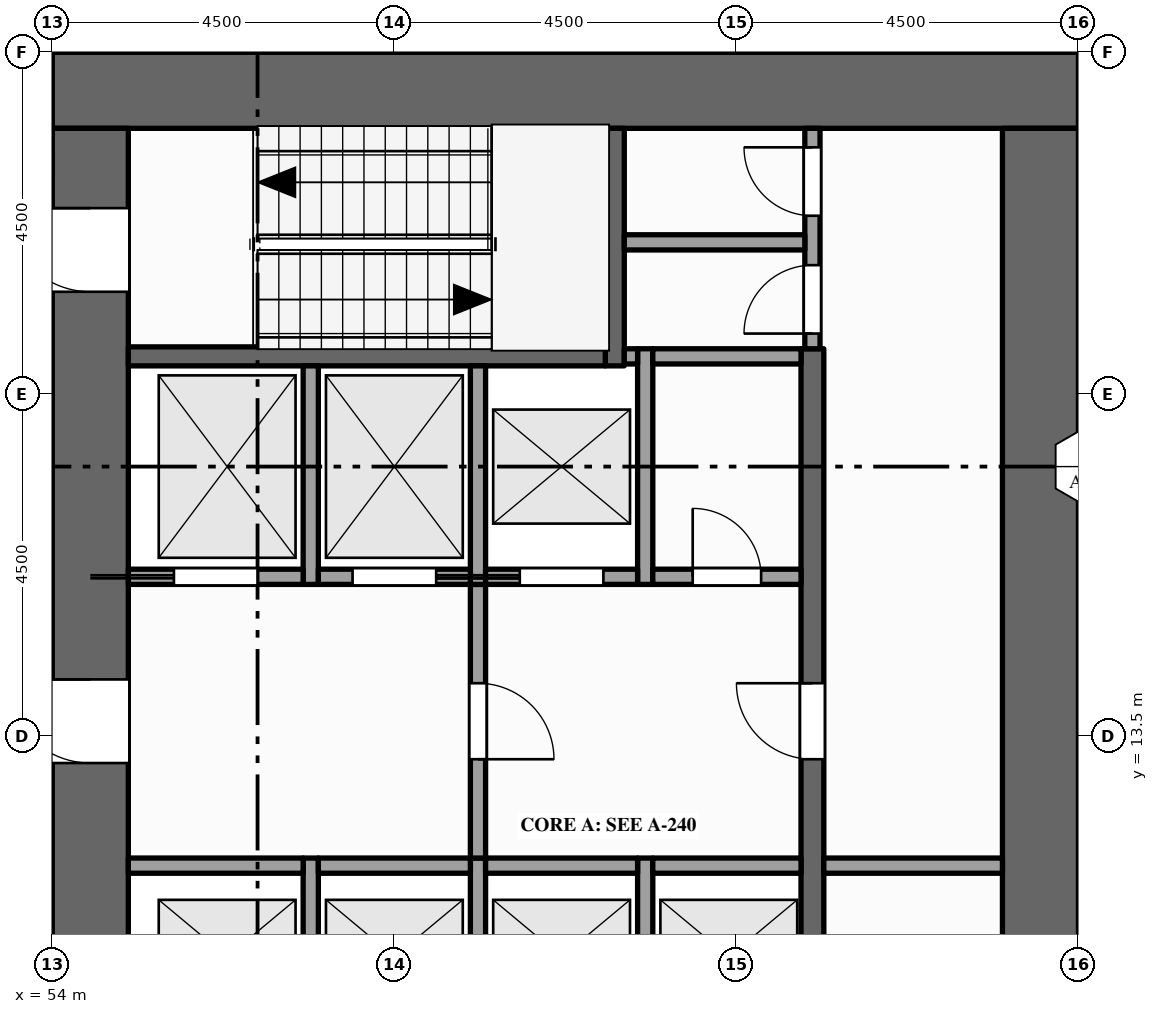
"""IFC4 building model, lengths in metres.
Left out: names, types, materials, properties, quantities, classifications, styles, units other than length and angle.
Written with IfcOpenShell. Run it as: python <this file> out.ifc"""

import sys

from ifc_helpers import new_model, si_unit, direction, frame, frame_2d, origin, place, context, subcontext, project, spatial, rectangle, extrude, element, fill, save


model = new_model("IFC4")
c1 = context("Model", 3, precision=1e-05, world=origin(), true_north=direction((0.0, 1.0)))
c2 = subcontext(c1, "Body", "Model", "MODEL_VIEW")
j1 = project(units=[si_unit("LENGTHUNIT", "METRE"), si_unit("PLANEANGLEUNIT", "RADIAN")], contexts=[c1])
p1 = place(None, origin())
s1 = spatial("IfcSite", under=j1, at=p1, CompositionType="ELEMENT")
p2 = place(p1, origin())
s2 = spatial("IfcBuilding", under=s1, at=p2, CompositionType="ELEMENT")
p3 = place(p2, frame((0.0, 0.0, 223.0)))
s3 = spatial("IfcBuildingStorey", under=s2, at=p3, CompositionType="ELEMENT", Elevation=223.0)
p4 = place(p3, frame((54.0, 22.0, -0.15), z_axis=(0.0, 0.0, 1.0), x_axis=(1.0, 0.0, 0.0)))
e1 = element("IfcWall", 1, at=p4, inside=s3, PredefinedType="SHEAR", context=c2, shape_type="SweptSolid", body=[
    extrude(rectangle(XDim=13.5, YDim=1.0, at=frame_2d((6.75, 0.0))), origin(), (0.0, 0.0, 1.0), 4.0),
])
p5 = place(p3, frame((54.5, 1.0, -0.15), z_axis=(0.0, 0.0, 1.0), x_axis=(0.0, 1.0, 0.0)))
e2 = element("IfcWall", 2, at=p5, inside=s3, PredefinedType="SHEAR", context=c2, shape_type="SweptSolid", body=[
    extrude(rectangle(XDim=20.5, YDim=1.0, at=frame_2d((10.25, 0.0))), origin(), (0.0, 0.0, 1.0), 4.0),
])
p6 = place(p5, frame((6.1, 0.0, 0.15)))
e3 = element("IfcOpeningElement", 3, at=p6, cuts=e2, PredefinedType="OPENING", context=c2, shape_type="SweptSolid", body=[
    extrude(rectangle(XDim=1.8, YDim=2.1, at=frame_2d((0.9, 1.05))), frame((0.0, 0.51, 0.0), z_axis=(0.0, -1.0, 0.0), x_axis=(1.0, 0.0, 0.0)), (0.0, 0.0, 1.0), 1.02),
])
p7 = place(p5, frame((12.15, 0.0, 0.15)))
e4 = element("IfcOpeningElement", 4, at=p7, cuts=e2, PredefinedType="OPENING", context=c2, shape_type="SweptSolid", body=[
    extrude(rectangle(XDim=1.1, YDim=2.1, at=frame_2d((0.55, 1.05))), frame((0.0, 0.51, 0.0), z_axis=(0.0, -1.0, 0.0), x_axis=(1.0, 0.0, 0.0)), (0.0, 0.0, 1.0), 1.02),
])
p8 = place(p5, frame((1.15, 0.0, 0.15)))
e5 = element("IfcOpeningElement", 5, at=p8, cuts=e2, PredefinedType="OPENING", context=c2, shape_type="SweptSolid", body=[
    extrude(rectangle(XDim=1.1, YDim=2.1, at=frame_2d((0.55, 1.05))), frame((0.0, 0.51, 0.0), z_axis=(0.0, -1.0, 0.0), x_axis=(1.0, 0.0, 0.0)), (0.0, 0.0, 1.0), 1.02),
])
p9 = place(p5, frame((18.35, 0.0, 0.15)))
e6 = element("IfcOpeningElement", 6, at=p9, cuts=e2, PredefinedType="OPENING", context=c2, shape_type="SweptSolid", body=[
    extrude(rectangle(XDim=1.1, YDim=2.1, at=frame_2d((0.55, 1.05))), frame((0.0, 0.51, 0.0), z_axis=(0.0, -1.0, 0.0), x_axis=(1.0, 0.0, 0.0)), (0.0, 0.0, 1.0), 1.02),
])
p10 = place(p3, frame((67.0, 1.0, -0.15), z_axis=(0.0, 0.0, 1.0), x_axis=(0.0, 1.0, 0.0)))
e7 = element("IfcWall", 7, at=p10, inside=s3, PredefinedType="SHEAR", context=c2, shape_type="SweptSolid", body=[
    extrude(rectangle(XDim=20.5, YDim=1.0, at=frame_2d((10.25, 0.0))), origin(), (0.0, 0.0, 1.0), 4.0),
])
p11 = place(p3, frame((57.4, 9.3, 0.0), z_axis=(0.0, 0.0, 1.0), x_axis=(0.0, 1.0, 0.0)))
e8 = element("IfcWall", 8, at=p11, inside=s3, PredefinedType="SOLIDWALL", context=c2, shape_type="SweptSolid", body=[
    extrude(rectangle(XDim=2.6, YDim=0.2, at=frame_2d((1.3, 0.0))), origin(), (0.0, 0.0, 1.0), 3.85),
])
p12 = place(p3, frame((57.4, 15.5, 0.0), z_axis=(0.0, 0.0, 1.0), x_axis=(0.0, 1.0, 0.0)))
e9 = element("IfcWall", 9, at=p12, inside=s3, PredefinedType="SOLIDWALL", context=c2, shape_type="SweptSolid", body=[
    extrude(rectangle(XDim=2.875, YDim=0.2, at=frame_2d((1.438, 0.0))), origin(), (0.0, 0.0, 1.0), 3.85),
])
p13 = place(p3, frame((59.6, 9.3, 0.0), z_axis=(0.0, 0.0, 1.0), x_axis=(0.0, 1.0, 0.0)))
e10 = element("IfcWall", 10, at=p13, inside=s3, PredefinedType="SOLIDWALL", context=c2, shape_type="SweptSolid", body=[
    extrude(rectangle(XDim=2.6, YDim=0.2, at=frame_2d((1.3, 0.0))), origin(), (0.0, 0.0, 1.0), 3.85),
])
p14 = place(p3, frame((59.6, 11.9, 0.0), z_axis=(0.0, 0.0, 1.0), x_axis=(0.0, 1.0, 0.0)))
e11 = element("IfcWall", 11, at=p14, inside=s3, PredefinedType="PARTITIONING", context=c2, shape_type="SweptSolid", body=[
    extrude(rectangle(XDim=3.6, YDim=0.2, at=frame_2d((1.8, 0.0))), origin(), (0.0, 0.0, 1.0), 3.85),
])
p15 = place(p14, frame((1.3, 0.0, 0.0)))
e12 = element("IfcOpeningElement", 12, at=p15, cuts=e11, PredefinedType="OPENING", context=c2, shape_type="SweptSolid", body=[
    extrude(rectangle(XDim=1.0, YDim=2.1, at=frame_2d((0.5, 1.05))), frame((0.0, 0.11, 0.0), z_axis=(0.0, -1.0, 0.0), x_axis=(1.0, 0.0, 0.0)), (0.0, 0.0, 1.0), 0.22),
])
p16 = place(p3, frame((59.6, 15.5, 0.0), z_axis=(0.0, 0.0, 1.0), x_axis=(0.0, 1.0, 0.0)))
e13 = element("IfcWall", 13, at=p16, inside=s3, PredefinedType="SOLIDWALL", context=c2, shape_type="SweptSolid", body=[
    extrude(rectangle(XDim=2.875, YDim=0.2, at=frame_2d((1.438, 0.0))), origin(), (0.0, 0.0, 1.0), 3.85),
])
p17 = place(p3, frame((61.4, 18.375, 0.0), z_axis=(0.0, 0.0, 1.0), x_axis=(0.0, 1.0, 0.0)))
e14 = element("IfcWall", 14, at=p17, inside=s3, PredefinedType="SHEAR", context=c2, shape_type="SweptSolid", body=[
    extrude(rectangle(XDim=3.125, YDim=0.25, at=frame_2d((1.562, 0.0))), origin(), (0.0, 0.0, 1.0), 3.85),
])
p18 = place(p3, frame((61.8, 9.3, 0.0), z_axis=(0.0, 0.0, 1.0), x_axis=(0.0, 1.0, 0.0)))
e15 = element("IfcWall", 15, at=p18, inside=s3, PredefinedType="SOLIDWALL", context=c2, shape_type="SweptSolid", body=[
    extrude(rectangle(XDim=2.6, YDim=0.2, at=frame_2d((1.3, 0.0))), origin(), (0.0, 0.0, 1.0), 3.85),
])
p19 = place(p3, frame((61.8, 15.5, 0.0), z_axis=(0.0, 0.0, 1.0), x_axis=(0.0, 1.0, 0.0)))
e16 = element("IfcWall", 16, at=p19, inside=s3, PredefinedType="SOLIDWALL", context=c2, shape_type="SweptSolid", body=[
    extrude(rectangle(XDim=3.1, YDim=0.2, at=frame_2d((1.55, 0.0))), origin(), (0.0, 0.0, 1.0), 3.85),
])
p20 = place(p3, frame((64.0, 4.1, 0.0), z_axis=(0.0, 0.0, 1.0), x_axis=(0.0, 1.0, 0.0)))
e17 = element("IfcWall", 17, at=p20, inside=s3, PredefinedType="SHEAR", context=c2, shape_type="SweptSolid", body=[
    extrude(rectangle(XDim=14.5, YDim=0.3, at=frame_2d((7.25, 0.0))), origin(), (0.0, 0.0, 1.0), 3.85),
])
p21 = place(p20, frame((3.4, 0.0, 0.0)))
e18 = element("IfcOpeningElement", 18, at=p21, cuts=e17, PredefinedType="OPENING", context=c2, shape_type="SweptSolid", body=[
    extrude(rectangle(XDim=1.0, YDim=2.1, at=frame_2d((0.5, 1.05))), frame((0.0, 0.16, 0.0), z_axis=(0.0, -1.0, 0.0), x_axis=(1.0, 0.0, 0.0)), (0.0, 0.0, 1.0), 0.32),
])
p22 = place(p20, frame((9.1, 0.0, 0.0)))
e19 = element("IfcOpeningElement", 19, at=p22, cuts=e17, PredefinedType="OPENING", context=c2, shape_type="SweptSolid", body=[
    extrude(rectangle(XDim=1.0, YDim=2.1, at=frame_2d((0.5, 1.05))), frame((0.0, 0.16, 0.0), z_axis=(0.0, -1.0, 0.0), x_axis=(1.0, 0.0, 0.0)), (0.0, 0.0, 1.0), 0.32),
])
p23 = place(p3, frame((64.0, 18.6, 0.0), z_axis=(0.0, 0.0, 1.0), x_axis=(0.0, 1.0, 0.0)))
e20 = element("IfcWall", 20, at=p23, inside=s3, PredefinedType="PARTITIONING", context=c2, shape_type="SweptSolid", body=[
    extrude(rectangle(XDim=2.9, YDim=0.2, at=frame_2d((1.45, 0.0))), origin(), (0.0, 0.0, 1.0), 3.85),
])
p24 = place(p23, frame((0.2, 0.0, 0.0)))
e21 = element("IfcOpeningElement", 21, at=p24, cuts=e20, PredefinedType="OPENING", context=c2, shape_type="SweptSolid", body=[
    extrude(rectangle(XDim=0.9, YDim=2.1, at=frame_2d((0.45, 1.05))), frame((0.0, 0.11, 0.0), z_axis=(0.0, -1.0, 0.0), x_axis=(1.0, 0.0, 0.0)), (0.0, 0.0, 1.0), 0.22),
])
p25 = place(p23, frame((1.75, 0.0, 0.0)))
e22 = element("IfcOpeningElement", 22, at=p25, cuts=e20, PredefinedType="OPENING", context=c2, shape_type="SweptSolid", body=[
    extrude(rectangle(XDim=0.9, YDim=2.1, at=frame_2d((0.45, 1.05))), frame((0.0, 0.11, 0.0), z_axis=(0.0, -1.0, 0.0), x_axis=(1.0, 0.0, 0.0)), (0.0, 0.0, 1.0), 0.22),
])
p26 = place(p3, frame((55.0, 11.8, 0.0), z_axis=(0.0, 0.0, 1.0), x_axis=(1.0, 0.0, 0.0)))
e23 = element("IfcWall", 23, at=p26, inside=s3, PredefinedType="SOLIDWALL", context=c2, shape_type="SweptSolid", body=[
    extrude(rectangle(XDim=2.3, YDim=0.2, at=frame_2d((1.15, 0.0))), origin(), (0.0, 0.0, 1.0), 3.85),
])
for number, where, z_axis, x_axis in (
    (24, (57.5, 11.8, 0.0), (0.0, 0.0, 1.0), (1.0, 0.0, 0.0)),
    (25, (59.7, 11.8, 0.0), (0.0, 0.0, 1.0), (1.0, 0.0, 0.0)),
):
    element("IfcWall", number, at=place(p3, frame(where, z_axis=z_axis, x_axis=x_axis)), inside=s3, PredefinedType="SOLIDWALL", context=c2, shape_type="SweptSolid", body=[
        extrude(rectangle(XDim=2.0, YDim=0.2, at=frame_2d((1.0, 0.0))), origin(), (0.0, 0.0, 1.0), 3.85),
    ])
p27 = place(p3, frame((61.9, 11.8, 0.0), z_axis=(0.0, 0.0, 1.0), x_axis=(1.0, 0.0, 0.0)))
e26 = element("IfcWall", 26, at=p27, inside=s3, PredefinedType="SOLIDWALL", context=c2, shape_type="SweptSolid", body=[
    extrude(rectangle(XDim=1.95, YDim=0.2, at=frame_2d((0.975, 0.0))), origin(), (0.0, 0.0, 1.0), 3.85),
])
p28 = place(p3, frame((64.15, 11.8, 0.0), z_axis=(0.0, 0.0, 1.0), x_axis=(1.0, 0.0, 0.0)))
e27 = element("IfcWall", 27, at=p28, inside=s3, PredefinedType="PARTITIONING", context=c2, shape_type="SweptSolid", body=[
    extrude(rectangle(XDim=2.35, YDim=0.2, at=frame_2d((1.175, 0.0))), origin(), (0.0, 0.0, 1.0), 3.85),
])
p29 = place(p3, frame((55.0, 15.6, 0.0), z_axis=(0.0, 0.0, 1.0), x_axis=(1.0, 0.0, 0.0)))
e28 = element("IfcWall", 28, at=p29, inside=s3, PredefinedType="SOLIDWALL", context=c2, shape_type="SweptSolid", body=[
    extrude(rectangle(XDim=2.3, YDim=0.2, at=frame_2d((1.15, 0.0))), origin(), (0.0, 0.0, 1.0), 3.85),
])
p30 = place(p29, frame((0.6, 0.0, 0.012)))
e29 = element("IfcOpeningElement", 29, at=p30, cuts=e28, PredefinedType="OPENING", context=c2, shape_type="SweptSolid", body=[
    extrude(rectangle(XDim=1.1, YDim=2.1, at=frame_2d((0.55, 1.05))), frame((0.0, 0.11, 0.0), z_axis=(0.0, -1.0, 0.0), x_axis=(1.0, 0.0, 0.0)), (0.0, 0.0, 1.0), 0.22),
])
p31 = place(p3, frame((57.5, 15.6, 0.0), z_axis=(0.0, 0.0, 1.0), x_axis=(1.0, 0.0, 0.0)))
e30 = element("IfcWall", 30, at=p31, inside=s3, PredefinedType="SOLIDWALL", context=c2, shape_type="SweptSolid", body=[
    extrude(rectangle(XDim=2.0, YDim=0.2, at=frame_2d((1.0, 0.0))), origin(), (0.0, 0.0, 1.0), 3.85),
])
p32 = place(p31, frame((0.45, 0.0, 0.012)))
e31 = element("IfcOpeningElement", 31, at=p32, cuts=e30, PredefinedType="OPENING", context=c2, shape_type="SweptSolid", body=[
    extrude(rectangle(XDim=1.1, YDim=2.1, at=frame_2d((0.55, 1.05))), frame((0.0, 0.11, 0.0), z_axis=(0.0, -1.0, 0.0), x_axis=(1.0, 0.0, 0.0)), (0.0, 0.0, 1.0), 0.22),
])
p33 = place(p3, frame((59.7, 15.6, 0.0), z_axis=(0.0, 0.0, 1.0), x_axis=(1.0, 0.0, 0.0)))
e32 = element("IfcWall", 32, at=p33, inside=s3, PredefinedType="SOLIDWALL", context=c2, shape_type="SweptSolid", body=[
    extrude(rectangle(XDim=2.0, YDim=0.2, at=frame_2d((1.0, 0.0))), origin(), (0.0, 0.0, 1.0), 3.85),
])
p34 = place(p33, frame((0.45, 0.0, 0.012)))
e33 = element("IfcOpeningElement", 33, at=p34, cuts=e32, PredefinedType="OPENING", context=c2, shape_type="SweptSolid", body=[
    extrude(rectangle(XDim=1.1, YDim=2.1, at=frame_2d((0.55, 1.05))), frame((0.0, 0.11, 0.0), z_axis=(0.0, -1.0, 0.0), x_axis=(1.0, 0.0, 0.0)), (0.0, 0.0, 1.0), 0.22),
])
p35 = place(p3, frame((61.9, 15.6, 0.0), z_axis=(0.0, 0.0, 1.0), x_axis=(1.0, 0.0, 0.0)))
e34 = element("IfcWall", 34, at=p35, inside=s3, PredefinedType="PARTITIONING", context=c2, shape_type="SweptSolid", body=[
    extrude(rectangle(XDim=1.95, YDim=0.2, at=frame_2d((0.975, 0.0))), origin(), (0.0, 0.0, 1.0), 3.85),
])
p36 = place(p35, frame((0.525, 0.0, 0.0)))
e35 = element("IfcOpeningElement", 35, at=p36, cuts=e34, PredefinedType="OPENING", context=c2, shape_type="SweptSolid", body=[
    extrude(rectangle(XDim=0.9, YDim=2.1, at=frame_2d((0.45, 1.05))), frame((0.0, 0.11, 0.0), z_axis=(0.0, -1.0, 0.0), x_axis=(1.0, 0.0, 0.0)), (0.0, 0.0, 1.0), 0.22),
])
p37 = place(p3, frame((55.0, 18.5, 0.0), z_axis=(0.0, 0.0, 1.0), x_axis=(1.0, 0.0, 0.0)))
e36 = element("IfcWall", 36, at=p37, inside=s3, PredefinedType="SHEAR", context=c2, shape_type="SweptSolid", body=[
    extrude(rectangle(XDim=6.275, YDim=0.25, at=frame_2d((3.137, 0.0))), origin(), (0.0, 0.0, 1.0), 3.85),
])
p38 = place(p3, frame((61.525, 18.5, 0.0), z_axis=(0.0, 0.0, 1.0), x_axis=(1.0, 0.0, 0.0)))
e37 = element("IfcWall", 37, at=p38, inside=s3, PredefinedType="SOLIDWALL", context=c2, shape_type="SweptSolid", body=[
    extrude(rectangle(XDim=0.175, YDim=0.2, at=frame_2d((0.087, 0.0))), origin(), (0.0, 0.0, 1.0), 3.85),
])
p39 = place(p3, frame((61.9, 18.5, 0.0), z_axis=(0.0, 0.0, 1.0), x_axis=(1.0, 0.0, 0.0)))
e38 = element("IfcWall", 38, at=p39, inside=s3, PredefinedType="PARTITIONING", context=c2, shape_type="SweptSolid", body=[
    extrude(rectangle(XDim=1.95, YDim=0.2, at=frame_2d((0.975, 0.0))), origin(), (0.0, 0.0, 1.0), 3.85),
])
p40 = place(p3, frame((61.525, 20.0, 0.0), z_axis=(0.0, 0.0, 1.0), x_axis=(1.0, 0.0, 0.0)))
e39 = element("IfcWall", 39, at=p40, inside=s3, PredefinedType="PARTITIONING", context=c2, shape_type="SweptSolid", body=[
    extrude(rectangle(XDim=2.375, YDim=0.2, at=frame_2d((1.188, 0.0))), origin(), (0.0, 0.0, 1.0), 3.85),
])
p41 = place(p30, origin())
e40 = element("IfcDoor", 40, at=p41, inside=s3, OperationType="SLIDING_TO_LEFT", PredefinedType="DOOR", context=c2, shape_type="SweptSolid", body=[
    extrude(rectangle(XDim=1.1, YDim=2.1, at=frame_2d((0.55, 1.05))), frame((0.0, 0.025, 0.0), z_axis=(0.0, -1.0, 0.0), x_axis=(1.0, 0.0, 0.0)), (0.0, 0.0, 1.0), 0.05),
])
fill(e29, e40)
p42 = place(p32, origin())
e41 = element("IfcDoor", 41, at=p42, inside=s3, OperationType="SLIDING_TO_RIGHT", PredefinedType="DOOR", context=c2, shape_type="SweptSolid", body=[
    extrude(rectangle(XDim=1.1, YDim=2.1, at=frame_2d((0.55, 1.05))), frame((0.0, 0.025, 0.0), z_axis=(0.0, -1.0, 0.0), x_axis=(1.0, 0.0, 0.0)), (0.0, 0.0, 1.0), 0.05),
])
fill(e31, e41)
p43 = place(p34, origin())
e42 = element("IfcDoor", 42, at=p43, inside=s3, OperationType="SLIDING_TO_LEFT", PredefinedType="DOOR", context=c2, shape_type="SweptSolid", body=[
    extrude(rectangle(XDim=1.1, YDim=2.1, at=frame_2d((0.55, 1.05))), frame((0.0, 0.025, 0.0), z_axis=(0.0, -1.0, 0.0), x_axis=(1.0, 0.0, 0.0)), (0.0, 0.0, 1.0), 0.05),
])
fill(e33, e42)
p44 = place(p7, origin())
e43 = element("IfcDoor", 43, at=p44, inside=s3, OperationType="SINGLE_SWING_RIGHT", PredefinedType="DOOR", context=c2, shape_type="SweptSolid", body=[
    extrude(rectangle(XDim=1.1, YDim=2.1, at=frame_2d((0.55, 1.05))), frame((0.0, 0.025, 0.0), z_axis=(0.0, -1.0, 0.0), x_axis=(1.0, 0.0, 0.0)), (0.0, 0.0, 1.0), 0.05),
])
fill(e4, e43)
p45 = place(p15, origin())
e44 = element("IfcDoor", 44, at=p45, inside=s3, OperationType="SINGLE_SWING_LEFT", PredefinedType="DOOR", context=c2, shape_type="SweptSolid", body=[
    extrude(rectangle(XDim=1.0, YDim=2.1, at=frame_2d((0.5, 1.05))), frame((0.0, 0.025, 0.0), z_axis=(0.0, -1.0, 0.0), x_axis=(1.0, 0.0, 0.0)), (0.0, 0.0, 1.0), 0.05),
])
fill(e12, e44)
p46 = place(p22, origin())
e45 = element("IfcDoor", 45, at=p46, inside=s3, OperationType="SINGLE_SWING_RIGHT", PredefinedType="DOOR", context=c2, shape_type="SweptSolid", body=[
    extrude(rectangle(XDim=1.0, YDim=2.1, at=frame_2d((0.5, 1.05))), frame((0.0, 0.025, 0.0), z_axis=(0.0, -1.0, 0.0), x_axis=(1.0, 0.0, 0.0)), (0.0, 0.0, 1.0), 0.05),
])
fill(e19, e45)
p47 = place(p9, origin())
e46 = element("IfcDoor", 46, at=p47, inside=s3, OperationType="SINGLE_SWING_RIGHT", PredefinedType="DOOR", context=c2, shape_type="SweptSolid", body=[
    extrude(rectangle(XDim=1.1, YDim=2.1, at=frame_2d((0.55, 1.05))), frame((0.0, 0.025, 0.0), z_axis=(0.0, -1.0, 0.0), x_axis=(1.0, 0.0, 0.0)), (0.0, 0.0, 1.0), 0.05),
])
fill(e6, e46)
p48 = place(p24, origin())
e47 = element("IfcDoor", 47, at=p48, inside=s3, OperationType="SINGLE_SWING_LEFT", PredefinedType="DOOR", context=c2, shape_type="SweptSolid", body=[
    extrude(rectangle(XDim=0.9, YDim=2.1, at=frame_2d((0.45, 1.05))), frame((0.0, 0.025, 0.0), z_axis=(0.0, -1.0, 0.0), x_axis=(1.0, 0.0, 0.0)), (0.0, 0.0, 1.0), 0.05),
])
fill(e21, e47)
p49 = place(p25, origin())
e48 = element("IfcDoor", 48, at=p49, inside=s3, OperationType="SINGLE_SWING_RIGHT", PredefinedType="DOOR", context=c2, shape_type="SweptSolid", body=[
    extrude(rectangle(XDim=0.9, YDim=2.1, at=frame_2d((0.45, 1.05))), frame((0.0, 0.025, 0.0), z_axis=(0.0, -1.0, 0.0), x_axis=(1.0, 0.0, 0.0)), (0.0, 0.0, 1.0), 0.05),
])
fill(e22, e48)
p50 = place(p36, origin())
e49 = element("IfcDoor", 49, at=p50, inside=s3, OperationType="SINGLE_SWING_LEFT", PredefinedType="DOOR", context=c2, shape_type="SweptSolid", body=[
    extrude(rectangle(XDim=0.9, YDim=2.1, at=frame_2d((0.45, 1.05))), frame((0.0, 0.025, 0.0), z_axis=(0.0, -1.0, 0.0), x_axis=(1.0, 0.0, 0.0)), (0.0, 0.0, 1.0), 0.05),
])
fill(e35, e49)
save(model, sys.argv[1])
